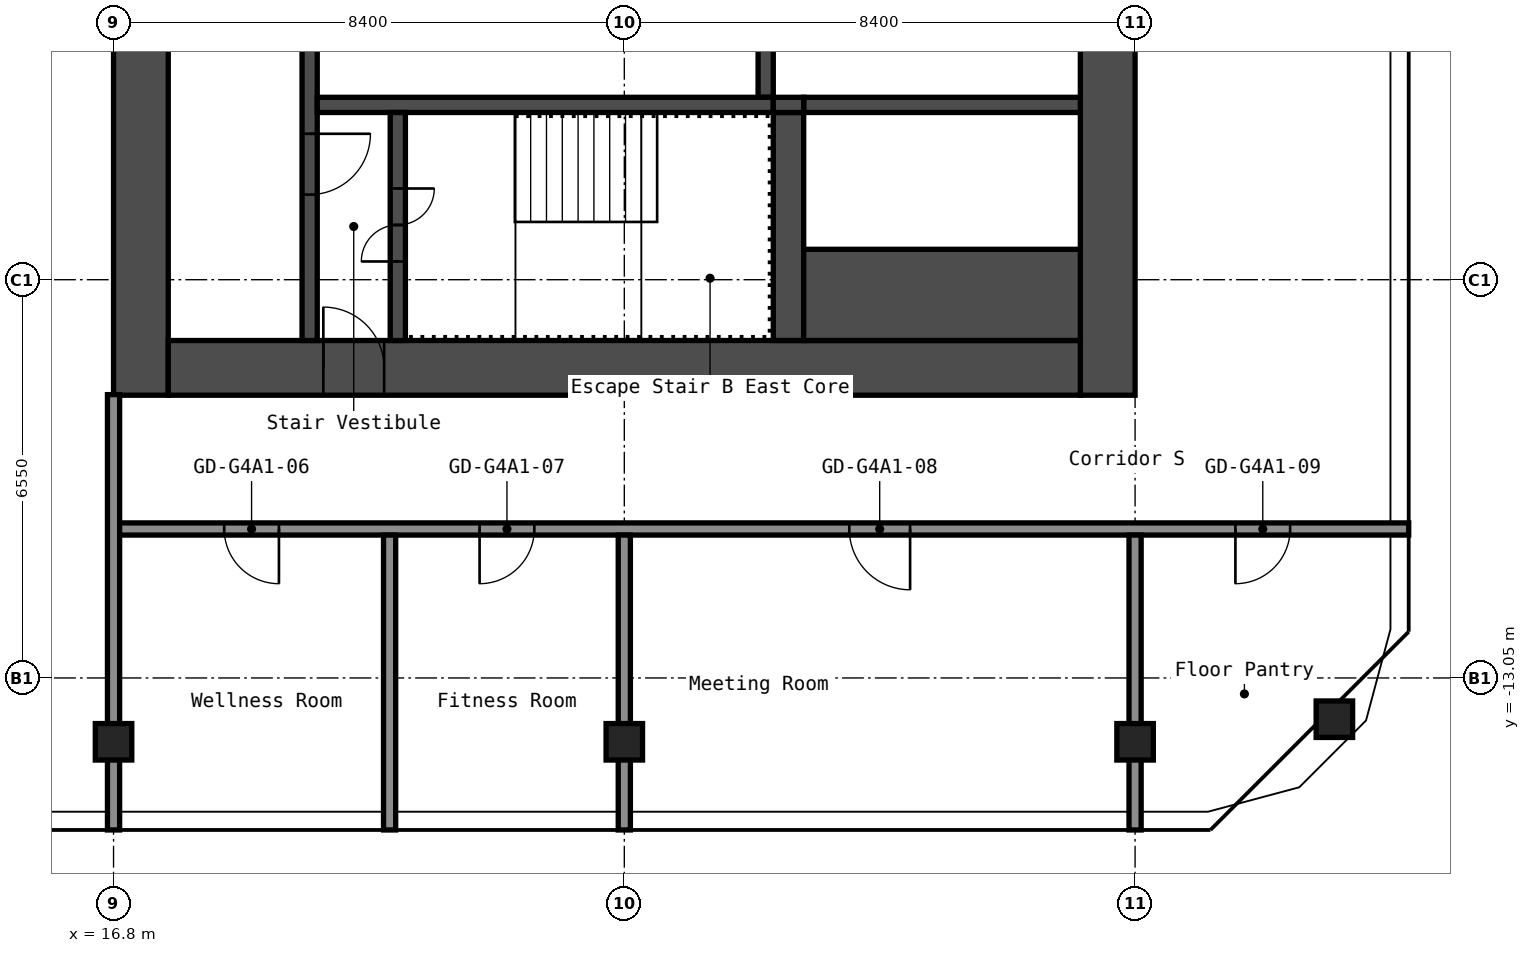
"""IFC4 building model, lengths in metres.
Left out: names, types, materials, properties, quantities, classifications, styles, units other than length and angle.
Written with IfcOpenShell. Run it as: python <this file> out.ifc"""

import sys

from ifc_helpers import new_model, si_unit, direction, frame, frame_2d, origin, origin_2d, place, context, subcontext, project, spatial, rectangle, hollow_rectangle, extrude, element, fill, save


model = new_model("IFC4")
c1 = context("Model", 3, precision=1e-05, world=origin(), true_north=direction((0.0, 1.0)))
c2 = subcontext(c1, "Body", "Model", "MODEL_VIEW")
j1 = project(units=[si_unit("LENGTHUNIT", "METRE"), si_unit("PLANEANGLEUNIT", "RADIAN")], contexts=[c1])
p1 = place(None, origin())
s1 = spatial("IfcSite", under=j1, at=p1, CompositionType="ELEMENT")
p2 = place(p1, origin())
s2 = spatial("IfcBuilding", under=s1, at=p2, CompositionType="ELEMENT")
p3 = place(p2, frame((0.0, 0.0, 202.6)))
s3 = spatial("IfcBuildingStorey", under=s2, at=p3, CompositionType="ELEMENT", Elevation=202.6)
for number, where, z_axis, x_axis in (
    (1, (16.8, -14.1, 0.0), (0.0, 0.0, 1.0), (1.0, 0.0, 0.0)),
    (2, (25.2, -14.1, 0.0), (0.0, 0.0, 1.0), (1.0, 0.0, 0.0)),
    (3, (33.6, -14.1, 0.0), (0.0, 0.0, 1.0), (1.0, 0.0, 0.0)),
    (4, (36.878, -13.729, 0.0), (0.0, 0.0, 1.0), (1.0, 0.0, 0.0)),
):
    element("IfcColumn", number, at=place(p3, frame(where, z_axis=z_axis, x_axis=x_axis)), inside=s3, PredefinedType="COLUMN", context=c2, shape_type="SweptSolid", body=[
        extrude(hollow_rectangle(XDim=0.6, YDim=0.6, WallThickness=0.025, InnerFilletRadius=0.038, OuterFilletRadius=0.062, at=origin_2d()), origin(), (0.0, 0.0, 1.0), 2.75),
    ])
p4 = place(p3, frame((17.25, -8.4, 0.0), z_axis=(0.0, 0.0, 1.0), x_axis=(0.0, 1.0, 0.0)))
e5 = element("IfcWall", 5, at=p4, inside=s3, PredefinedType="SHEAR", context=c2, shape_type="SweptSolid", body=[
    extrude(rectangle(XDim=16.8, YDim=0.9, at=frame_2d((8.4, 0.0))), origin(), (0.0, 0.0, 1.0), 2.75),
])
p5 = place(p4, frame((10.1, 0.0, 0.0)))
e6 = element("IfcOpeningElement", 6, at=p5, cuts=e5, PredefinedType="OPENING", context=c2, shape_type="SweptSolid", body=[
    extrude(rectangle(XDim=1.6, YDim=2.1, at=frame_2d((0.8, 1.05))), frame((0.0, 0.46, 0.0), z_axis=(0.0, -1.0, 0.0), x_axis=(1.0, 0.0, 0.0)), (0.0, 0.0, 1.0), 0.92),
])
p6 = place(p3, frame((33.15, -8.4, 0.0), z_axis=(0.0, 0.0, 1.0), x_axis=(0.0, 1.0, 0.0)))
e7 = element("IfcWall", 7, at=p6, inside=s3, PredefinedType="SHEAR", context=c2, shape_type="SweptSolid", body=[
    extrude(rectangle(XDim=16.8, YDim=0.9, at=frame_2d((8.4, 0.0))), origin(), (0.0, 0.0, 1.0), 2.75),
])
p7 = place(p3, frame((17.7, -7.95, 0.0), z_axis=(0.0, 0.0, 1.0), x_axis=(1.0, 0.0, 0.0)))
e8 = element("IfcWall", 8, at=p7, inside=s3, PredefinedType="SHEAR", context=c2, shape_type="SweptSolid", body=[
    extrude(rectangle(XDim=15.0, YDim=0.9, at=frame_2d((7.5, 0.0))), origin(), (0.0, 0.0, 1.0), 2.75),
])
p8 = place(p7, frame((2.55, 0.0, 0.0)))
e9 = element("IfcOpeningElement", 9, at=p8, cuts=e8, PredefinedType="OPENING", context=c2, shape_type="SweptSolid", body=[
    extrude(rectangle(XDim=1.0, YDim=2.1, at=frame_2d((0.5, 1.05))), frame((0.0, 0.46, 0.0), z_axis=(0.0, -1.0, 0.0), x_axis=(1.0, 0.0, 0.0)), (0.0, 0.0, 1.0), 0.92),
])
p9 = place(p3, frame((20.025, -7.5, 0.0), z_axis=(0.0, 0.0, 1.0), x_axis=(0.0, 1.0, 0.0)))
e10 = element("IfcWall", 10, at=p9, inside=s3, PredefinedType="SHEAR", context=c2, shape_type="SweptSolid", body=[
    extrude(rectangle(XDim=6.3, YDim=0.25, at=frame_2d((3.15, 0.0))), origin(), (0.0, 0.0, 1.0), 2.75),
])
p10 = place(p9, frame((2.4, 0.0, 0.0)))
e11 = element("IfcOpeningElement", 11, at=p10, cuts=e10, PredefinedType="OPENING", context=c2, shape_type="SweptSolid", body=[
    extrude(rectangle(XDim=1.0, YDim=2.1, at=frame_2d((0.5, 1.05))), frame((0.0, 0.135, 0.0), z_axis=(0.0, -1.0, 0.0), x_axis=(1.0, 0.0, 0.0)), (0.0, 0.0, 1.0), 0.27),
])
p11 = place(p3, frame((27.525, -3.5, 0.0), z_axis=(0.0, 0.0, 1.0), x_axis=(0.0, 1.0, 0.0)))
e12 = element("IfcWall", 12, at=p11, inside=s3, PredefinedType="SHEAR", context=c2, shape_type="SweptSolid", body=[
    extrude(rectangle(XDim=2.05, YDim=0.25, at=frame_2d((1.025, 0.0))), origin(), (0.0, 0.0, 1.0), 2.75),
])
p12 = place(p3, frame((20.15, -3.625, 0.0), z_axis=(0.0, 0.0, 1.0), x_axis=(1.0, 0.0, 0.0)))
e13 = element("IfcWall", 13, at=p12, inside=s3, PredefinedType="SHEAR", context=c2, shape_type="SweptSolid", body=[
    extrude(rectangle(XDim=7.5, YDim=0.25, at=frame_2d((3.75, 0.0))), origin(), (0.0, 0.0, 1.0), 2.75),
])
p13 = place(p3, frame((21.475, -7.5, 0.0), z_axis=(0.0, 0.0, 1.0), x_axis=(0.0, 1.0, 0.0)))
e14 = element("IfcWall", 14, at=p13, inside=s3, PredefinedType="SHEAR", context=c2, shape_type="SweptSolid", body=[
    extrude(rectangle(XDim=3.75, YDim=0.25, at=frame_2d((1.875, 0.0))), origin(), (0.0, 0.0, 1.0), 2.75),
])
p14 = place(p13, frame((1.3, 0.0, 0.0)))
e15 = element("IfcOpeningElement", 15, at=p14, cuts=e14, PredefinedType="OPENING", context=c2, shape_type="SweptSolid", body=[
    extrude(rectangle(XDim=1.2, YDim=2.1, at=frame_2d((0.6, 1.05))), frame((0.0, 0.135, 0.0), z_axis=(0.0, -1.0, 0.0), x_axis=(1.0, 0.0, 0.0)), (0.0, 0.0, 1.0), 0.27),
])
p15 = place(p3, frame((27.9, -7.5, 0.0), z_axis=(0.0, 0.0, 1.0), x_axis=(0.0, 1.0, 0.0)))
e16 = element("IfcWall", 16, at=p15, inside=s3, PredefinedType="SHEAR", context=c2, shape_type="SweptSolid", body=[
    extrude(rectangle(XDim=3.75, YDim=0.5, at=frame_2d((1.875, 0.0))), origin(), (0.0, 0.0, 1.0), 2.75),
])
p16 = place(p3, frame((28.15, -3.625, 0.0), z_axis=(0.0, 0.0, 1.0), x_axis=(1.0, 0.0, 0.0)))
e17 = element("IfcWall", 17, at=p16, inside=s3, PredefinedType="SHEAR", context=c2, shape_type="SweptSolid", body=[
    extrude(rectangle(XDim=4.55, YDim=0.25, at=frame_2d((2.275, 0.0))), origin(), (0.0, 0.0, 1.0), 2.75),
])
p17 = place(p3, frame((28.15, -6.75, 0.0), z_axis=(0.0, 0.0, 1.0), x_axis=(1.0, 0.0, 0.0)))
e18 = element("IfcWall", 18, at=p17, inside=s3, PredefinedType="SHEAR", context=c2, shape_type="SweptSolid", body=[
    extrude(rectangle(XDim=4.55, YDim=1.5, at=frame_2d((2.275, 0.0))), origin(), (0.0, 0.0, 1.0), 2.75),
])
p18 = place(p3, frame((27.65, -3.625, 0.0), z_axis=(0.0, 0.0, 1.0), x_axis=(1.0, 0.0, 0.0)))
e19 = element("IfcWall", 19, at=p18, inside=s3, PredefinedType="SHEAR", context=c2, shape_type="SweptSolid", body=[
    extrude(rectangle(XDim=0.5, YDim=0.25, at=frame_2d((0.25, 0.0))), origin(), (0.0, 0.0, 1.0), 2.75),
])
p19 = place(p3, frame((16.8, -10.6, 0.0), z_axis=(0.0, 0.0, 1.0), x_axis=(1.0, 0.0, 0.0)))
e20 = element("IfcWall", 20, at=p19, inside=s3, PredefinedType="PARTITIONING", context=c2, shape_type="SweptSolid", body=[
    extrude(rectangle(XDim=21.3, YDim=0.2, at=frame_2d((10.65, 0.0))), origin(), (0.0, 0.0, 1.0), 2.75),
])
p20 = place(p19, frame((1.82, 0.0, 0.0)))
e21 = element("IfcOpeningElement", 21, at=p20, cuts=e20, PredefinedType="OPENING", context=c2, shape_type="SweptSolid", body=[
    extrude(rectangle(XDim=0.9, YDim=2.1, at=frame_2d((0.45, 1.05))), frame((0.0, 0.11, 0.0), z_axis=(0.0, -1.0, 0.0), x_axis=(1.0, 0.0, 0.0)), (0.0, 0.0, 1.0), 0.22),
])
p21 = place(p19, frame((6.02, 0.0, 0.0)))
e22 = element("IfcOpeningElement", 22, at=p21, cuts=e20, PredefinedType="OPENING", context=c2, shape_type="SweptSolid", body=[
    extrude(rectangle(XDim=0.9, YDim=2.1, at=frame_2d((0.45, 1.05))), frame((0.0, 0.11, 0.0), z_axis=(0.0, -1.0, 0.0), x_axis=(1.0, 0.0, 0.0)), (0.0, 0.0, 1.0), 0.22),
])
p22 = place(p19, frame((12.1, 0.0, 0.0)))
e23 = element("IfcOpeningElement", 23, at=p22, cuts=e20, PredefinedType="OPENING", context=c2, shape_type="SweptSolid", body=[
    extrude(rectangle(XDim=1.0, YDim=2.1, at=frame_2d((0.5, 1.05))), frame((0.0, 0.11, 0.0), z_axis=(0.0, -1.0, 0.0), x_axis=(1.0, 0.0, 0.0)), (0.0, 0.0, 1.0), 0.22),
])
p23 = place(p19, frame((18.45, 0.0, 0.0)))
e24 = element("IfcOpeningElement", 24, at=p23, cuts=e20, PredefinedType="OPENING", context=c2, shape_type="SweptSolid", body=[
    extrude(rectangle(XDim=0.9, YDim=2.1, at=frame_2d((0.45, 1.05))), frame((0.0, 0.11, 0.0), z_axis=(0.0, -1.0, 0.0), x_axis=(1.0, 0.0, 0.0)), (0.0, 0.0, 1.0), 0.22),
])
p24 = place(p3, frame((16.8, -15.55, 0.0), z_axis=(0.0, 0.0, 1.0), x_axis=(0.0, 1.0, 0.0)))
e25 = element("IfcWall", 25, at=p24, inside=s3, PredefinedType="PARTITIONING", context=c2, shape_type="SweptSolid", body=[
    extrude(rectangle(XDim=7.16, YDim=0.2, at=frame_2d((3.58, 0.0))), origin(), (0.0, 0.0, 1.0), 2.75),
])
for number, where, z_axis, x_axis in (
    (26, (21.34, -15.55, 0.0), (0.0, 0.0, 1.0), (0.0, 1.0, 0.0)),
    (27, (25.2, -15.55, 0.0), (0.0, 0.0, 1.0), (0.0, 1.0, 0.0)),
    (28, (33.6, -15.55, 0.0), (0.0, 0.0, 1.0), (0.0, 1.0, 0.0)),
):
    element("IfcWall", number, at=place(p3, frame(where, z_axis=z_axis, x_axis=x_axis)), inside=s3, PredefinedType="PARTITIONING", context=c2, shape_type="SweptSolid", body=[
        extrude(rectangle(XDim=4.85, YDim=0.2, at=frame_2d((2.425, 0.0))), origin(), (0.0, 0.0, 1.0), 2.75),
    ])
p25 = place(p8, origin())
e29 = element("IfcDoor", 29, at=p25, inside=s3, OperationType="SINGLE_SWING_RIGHT", PredefinedType="DOOR", context=c2, shape_type="SweptSolid", body=[
    extrude(rectangle(XDim=1.0, YDim=2.1, at=frame_2d((0.5, 1.05))), frame((0.0, 0.025, 0.0), z_axis=(0.0, -1.0, 0.0), x_axis=(1.0, 0.0, 0.0)), (0.0, 0.0, 1.0), 0.05),
])
fill(e9, e29)
p26 = place(p14, origin())
e30 = element("IfcDoor", 30, at=p26, inside=s3, OperationType="DOUBLE_DOOR_SINGLE_SWING", PredefinedType="DOOR", context=c2, shape_type="SweptSolid", body=[
    extrude(rectangle(XDim=1.2, YDim=2.1, at=frame_2d((0.6, 1.05))), frame((0.0, 0.025, 0.0), z_axis=(0.0, -1.0, 0.0), x_axis=(1.0, 0.0, 0.0)), (0.0, 0.0, 1.0), 0.05),
])
fill(e15, e30)
p27 = place(p10, origin())
e31 = element("IfcDoor", 31, at=p27, inside=s3, OperationType="SINGLE_SWING_RIGHT", PredefinedType="DOOR", context=c2, shape_type="SweptSolid", body=[
    extrude(rectangle(XDim=1.0, YDim=2.1, at=frame_2d((0.5, 1.05))), frame((0.0, 0.025, 0.0), z_axis=(0.0, -1.0, 0.0), x_axis=(1.0, 0.0, 0.0)), (0.0, 0.0, 1.0), 0.05),
])
fill(e11, e31)
p28 = place(p20, origin())
e32 = element("IfcDoor", 32, at=p28, inside=s3, OperationType="SINGLE_SWING_RIGHT", PredefinedType="DOOR", context=c2, shape_type="SweptSolid", body=[
    extrude(rectangle(XDim=0.9, YDim=2.1, at=frame_2d((0.45, 1.05))), frame((0.0, 0.025, 0.0), z_axis=(0.0, -1.0, 0.0), x_axis=(1.0, 0.0, 0.0)), (0.0, 0.0, 1.0), 0.05),
])
fill(e21, e32)
p29 = place(p21, origin())
e33 = element("IfcDoor", 33, at=p29, inside=s3, OperationType="SINGLE_SWING_LEFT", PredefinedType="DOOR", context=c2, shape_type="SweptSolid", body=[
    extrude(rectangle(XDim=0.9, YDim=2.1, at=frame_2d((0.45, 1.05))), frame((0.0, 0.025, 0.0), z_axis=(0.0, -1.0, 0.0), x_axis=(1.0, 0.0, 0.0)), (0.0, 0.0, 1.0), 0.05),
])
fill(e22, e33)
p30 = place(p22, origin())
e34 = element("IfcDoor", 34, at=p30, inside=s3, OperationType="SINGLE_SWING_RIGHT", PredefinedType="DOOR", context=c2, shape_type="SweptSolid", body=[
    extrude(rectangle(XDim=1.0, YDim=2.1, at=frame_2d((0.5, 1.05))), frame((0.0, 0.025, 0.0), z_axis=(0.0, -1.0, 0.0), x_axis=(1.0, 0.0, 0.0)), (0.0, 0.0, 1.0), 0.05),
])
fill(e23, e34)
p31 = place(p23, origin())
e35 = element("IfcDoor", 35, at=p31, inside=s3, OperationType="SINGLE_SWING_LEFT", PredefinedType="DOOR", context=c2, shape_type="SweptSolid", body=[
    extrude(rectangle(XDim=0.9, YDim=2.1, at=frame_2d((0.45, 1.05))), frame((0.0, 0.025, 0.0), z_axis=(0.0, -1.0, 0.0), x_axis=(1.0, 0.0, 0.0)), (0.0, 0.0, 1.0), 0.05),
])
fill(e24, e35)
save(model, sys.argv[1])
